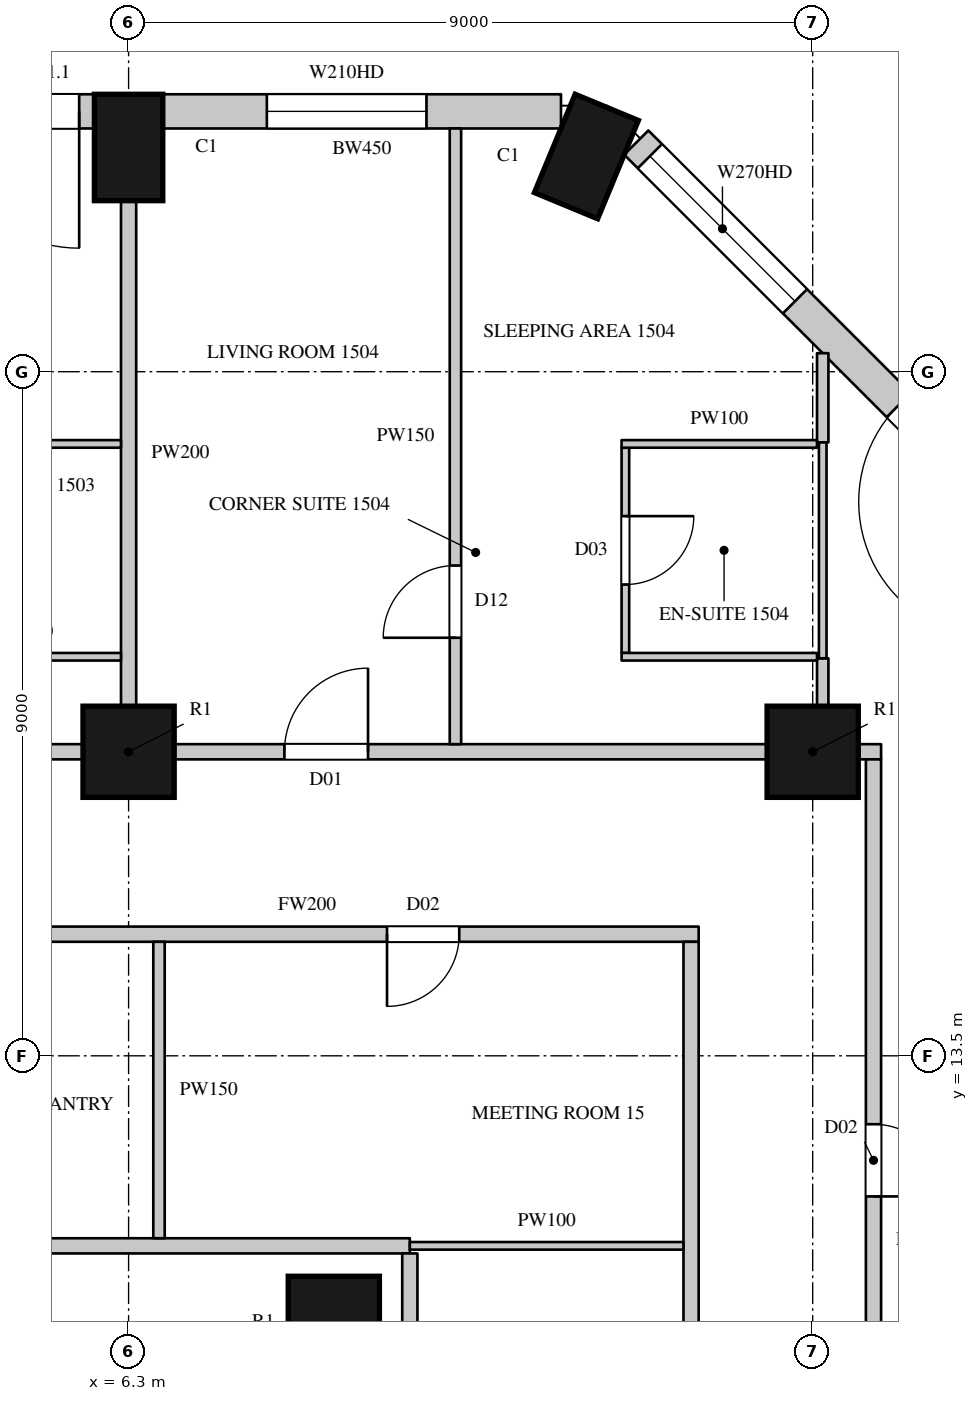
"""IFC4 building model, lengths in metres.
Left out: names, types, materials, properties, quantities, classifications, styles, units other than length and angle.
Written with IfcOpenShell. Run it as: python <this file> out.ifc"""

import sys

from ifc_helpers import new_model, si_unit, direction, frame, frame_2d, origin, origin_2d, place, context, subcontext, project, spatial, rectangle, circle, extrude, element, fill, save


model = new_model("IFC4")
c1 = context("Model", 3, precision=1e-05, world=origin(), true_north=direction((0.0, 1.0)))
c2 = subcontext(c1, "Body", "Model", "MODEL_VIEW")
j1 = project(units=[si_unit("LENGTHUNIT", "METRE"), si_unit("PLANEANGLEUNIT", "RADIAN")], contexts=[c1])
p1 = place(None, origin())
s1 = spatial("IfcSite", under=j1, at=p1, CompositionType="ELEMENT")
p2 = place(p1, origin())
s2 = spatial("IfcBuilding", under=s1, at=p2, CompositionType="ELEMENT")
p3 = place(p2, frame((0.0, 0.0, 84.3)))
s3 = spatial("IfcBuildingStorey", under=s2, at=p3, CompositionType="ELEMENT", Elevation=84.3)
for number, where, z_axis, x_axis in (
    (1, (12.323, 25.331, 0.0), (0.0, 0.0, 1.0), (-0.924, 0.383, 0.0)),
    (2, (6.3, 25.45, 0.0), (0.0, 0.0, 1.0), (-1.0, 0.0, 0.0)),
):
    element("IfcColumn", number, at=place(p3, frame(where, z_axis=z_axis, x_axis=x_axis)), inside=s3, PredefinedType="COLUMN", context=c2, shape_type="SweptSolid", body=[
        extrude(rectangle(XDim=0.9, YDim=1.4, at=origin_2d()), origin(), (0.0, 0.0, 1.0), 3.6),
    ])
for number, where, z_axis, x_axis in (
    (3, (6.3, 17.5, 0.0), (0.0, 0.0, 1.0), (1.0, 0.0, 0.0)),
    (4, (15.3, 17.5, 0.0), (0.0, 0.0, 1.0), (1.0, 0.0, 0.0)),
    (5, (9.0, 10.0, 0.0), (0.0, 0.0, 1.0), (1.0, 0.0, 0.0)),
):
    element("IfcColumn", number, at=place(p3, frame(where, z_axis=z_axis, x_axis=x_axis)), inside=s3, PredefinedType="COLUMN", context=c2, shape_type="SweptSolid", body=[
        extrude(circle(Radius=0.6, at=origin_2d()), origin(), (0.0, 0.0, 1.0), 3.6),
    ])
p4 = place(p3, frame((18.229, 20.265, 0.0), z_axis=(0.0, 0.0, 1.0), x_axis=(-0.707106781187, 0.707106781187, 0.0)))
e6 = element("IfcWall", 6, at=p4, inside=s3, PredefinedType="SOLIDWALL", context=c2, shape_type="SweptSolid", body=[
    extrude(rectangle(XDim=7.424, YDim=0.45, at=frame_2d((3.712, 0.0))), origin(), (0.0, 0.0, 1.0), 3.3),
])
p5 = place(p4, frame((0.74, 0.0, 0.0)))
e7 = element("IfcOpeningElement", 7, at=p5, cuts=e6, PredefinedType="OPENING", context=c2, shape_type="SweptSolid", body=[
    extrude(rectangle(XDim=1.8, YDim=2.4, at=frame_2d((0.9, 1.2))), frame((0.0, 0.235, 0.0), z_axis=(0.0, -1.0, 0.0), x_axis=(1.0, 0.0, 0.0)), (0.0, 0.0, 1.0), 0.47),
])
p6 = place(p4, frame((4.471, 0.0, 1.05)))
e8 = element("IfcOpeningElement", 8, at=p6, cuts=e6, PredefinedType="OPENING", context=c2, shape_type="SweptSolid", body=[
    extrude(rectangle(XDim=2.7, YDim=2.0, at=frame_2d((1.35, 1.0))), frame((0.0, 0.235, 0.0), z_axis=(0.0, -1.0, 0.0), x_axis=(1.0, 0.0, 0.0)), (0.0, 0.0, 1.0), 0.47),
])
p7 = place(p3, frame((11.989, 25.925, 0.0), z_axis=(0.0, 0.0, 1.0), x_axis=(-1.0, 0.0, 0.0)))
e9 = element("IfcWall", 9, at=p7, inside=s3, PredefinedType="SOLIDWALL", context=c2, shape_type="SweptSolid", body=[
    extrude(rectangle(XDim=5.239, YDim=0.45, at=frame_2d((2.619, 0.0))), origin(), (0.0, 0.0, 1.0), 3.3),
])
p8 = place(p7, frame((1.77, 0.0, 1.05)))
e10 = element("IfcOpeningElement", 10, at=p8, cuts=e9, PredefinedType="OPENING", context=c2, shape_type="SweptSolid", body=[
    extrude(rectangle(XDim=2.1, YDim=2.0, at=frame_2d((1.05, 1.0))), frame((0.0, 0.235, 0.0), z_axis=(0.0, -1.0, 0.0), x_axis=(1.0, 0.0, 0.0)), (0.0, 0.0, 1.0), 0.47),
])
p9 = place(p3, frame((5.85, 25.925, 0.0), z_axis=(0.0, 0.0, 1.0), x_axis=(-1.0, 0.0, 0.0)))
e11 = element("IfcWall", 11, at=p9, inside=s3, PredefinedType="SOLIDWALL", context=c2, shape_type="SweptSolid", body=[
    extrude(rectangle(XDim=8.1, YDim=0.45, at=frame_2d((4.05, 0.0))), origin(), (0.0, 0.0, 1.0), 3.3),
])
p10 = place(p9, frame((0.2, 0.0, 0.0)))
e12 = element("IfcOpeningElement", 12, at=p10, cuts=e11, PredefinedType="OPENING", context=c2, shape_type="SweptSolid", body=[
    extrude(rectangle(XDim=1.8, YDim=2.4, at=frame_2d((0.9, 1.2))), frame((0.0, 0.235, 0.0), z_axis=(0.0, -1.0, 0.0), x_axis=(1.0, 0.0, 0.0)), (0.0, 0.0, 1.0), 0.47),
])
p11 = place(p9, frame((2.2, 0.0, 1.05)))
e13 = element("IfcOpeningElement", 13, at=p11, cuts=e11, PredefinedType="OPENING", context=c2, shape_type="SweptSolid", body=[
    extrude(rectangle(XDim=1.2, YDim=2.0, at=frame_2d((0.6, 1.0))), frame((0.0, 0.235, 0.0), z_axis=(0.0, -1.0, 0.0), x_axis=(1.0, 0.0, 0.0)), (0.0, 0.0, 1.0), 0.47),
])
p12 = place(p9, frame((4.7, 0.0, 0.0)))
e14 = element("IfcOpeningElement", 14, at=p12, cuts=e11, PredefinedType="OPENING", context=c2, shape_type="SweptSolid", body=[
    extrude(rectangle(XDim=1.8, YDim=2.4, at=frame_2d((0.9, 1.2))), frame((0.0, 0.235, 0.0), z_axis=(0.0, -1.0, 0.0), x_axis=(1.0, 0.0, 0.0)), (0.0, 0.0, 1.0), 0.47),
])
p13 = place(p9, frame((6.7, 0.0, 1.05)))
e15 = element("IfcOpeningElement", 15, at=p13, cuts=e11, PredefinedType="OPENING", context=c2, shape_type="SweptSolid", body=[
    extrude(rectangle(XDim=1.2, YDim=2.0, at=frame_2d((0.6, 1.0))), frame((0.0, 0.235, 0.0), z_axis=(0.0, -1.0, 0.0), x_axis=(1.0, 0.0, 0.0)), (0.0, 0.0, 1.0), 0.47),
])
p14 = place(p3, frame((16.486, 23.529, 0.0), z_axis=(0.0, 0.0, 1.0), x_axis=(-0.707022305137, 0.707191247145, 0.0)))
e16 = element("IfcWall", 16, at=p14, inside=s3, PredefinedType="SOLIDWALL", context=c2, shape_type="SweptSolid", body=[
    extrude(rectangle(XDim=1.445, YDim=0.45, at=frame_2d((0.723, 0.0))), origin(), (0.0, 0.0, 1.0), 0.6),
])
p15 = place(p3, frame((-2.1, 17.5, 0.0), z_axis=(0.0, 0.0, 1.0), x_axis=(1.0, 0.0, 0.0)))
e17 = element("IfcWall", 17, at=p15, inside=s3, PredefinedType="PARTITIONING", context=c2, shape_type="SweptSolid", body=[
    extrude(rectangle(XDim=7.8, YDim=0.2, at=frame_2d((3.9, 0.0))), origin(), (0.0, 0.0, 1.0), 2.75),
])
p16 = place(p15, frame((1.55, 0.0, 0.0)))
e18 = element("IfcOpeningElement", 18, at=p16, cuts=e17, PredefinedType="OPENING", context=c2, shape_type="SweptSolid", body=[
    extrude(rectangle(XDim=1.1, YDim=2.4, at=frame_2d((0.55, 1.2))), frame((0.0, 0.11, 0.0), z_axis=(0.0, -1.0, 0.0), x_axis=(1.0, 0.0, 0.0)), (0.0, 0.0, 1.0), 0.22),
])
p17 = place(p3, frame((6.9, 17.5, 0.0), z_axis=(0.0, 0.0, 1.0), x_axis=(1.0, 0.0, 0.0)))
e19 = element("IfcWall", 19, at=p17, inside=s3, PredefinedType="PARTITIONING", context=c2, shape_type="SweptSolid", body=[
    extrude(rectangle(XDim=7.8, YDim=0.2, at=frame_2d((3.9, 0.0))), origin(), (0.0, 0.0, 1.0), 2.75),
])
p18 = place(p17, frame((1.45, 0.0, 0.0)))
e20 = element("IfcOpeningElement", 20, at=p18, cuts=e19, PredefinedType="OPENING", context=c2, shape_type="SweptSolid", body=[
    extrude(rectangle(XDim=1.1, YDim=2.4, at=frame_2d((0.55, 1.2))), frame((0.0, 0.11, 0.0), z_axis=(0.0, -1.0, 0.0), x_axis=(1.0, 0.0, 0.0)), (0.0, 0.0, 1.0), 0.22),
])
p19 = place(p3, frame((15.9, 17.5, 0.0), z_axis=(0.0, 0.0, 1.0), x_axis=(1.0, 0.0, 0.0)))
e21 = element("IfcWall", 21, at=p19, inside=s3, PredefinedType="PARTITIONING", context=c2, shape_type="SweptSolid", body=[
    extrude(rectangle(XDim=0.3, YDim=0.2, at=frame_2d((0.15, 0.0))), origin(), (0.0, 0.0, 1.0), 3.3),
])
p20 = place(p3, frame((-7.9, 11.0, 0.0), z_axis=(0.0, 0.0, 1.0), x_axis=(1.0, 0.0, 0.0)))
e22 = element("IfcWall", 22, at=p20, inside=s3, PredefinedType="PARTITIONING", context=c2, shape_type="SweptSolid", body=[
    extrude(rectangle(XDim=17.9, YDim=0.2, at=frame_2d((8.95, 0.0))), origin(), (0.0, 0.0, 1.0), 3.3),
])
p21 = place(p20, frame((9.5, 0.0, 0.0)))
e23 = element("IfcOpeningElement", 23, at=p21, cuts=e22, PredefinedType="OPENING", context=c2, shape_type="SweptSolid", body=[
    extrude(rectangle(XDim=1.5, YDim=2.2, at=frame_2d((0.75, 1.1))), frame((0.0, 0.11, 0.0), z_axis=(0.0, -1.0, 0.0), x_axis=(1.0, 0.0, 0.0)), (0.0, 0.0, 1.0), 0.22),
])
p22 = place(p3, frame((3.5, 15.1, 0.0), z_axis=(0.0, 0.0, 1.0), x_axis=(1.0, 0.0, 0.0)))
e24 = element("IfcWall", 24, at=p22, inside=s3, PredefinedType="PARTITIONING", context=c2, shape_type="SweptSolid", body=[
    extrude(rectangle(XDim=10.3, YDim=0.2, at=frame_2d((5.15, 0.0))), origin(), (0.0, 0.0, 1.0), 3.3),
])
p23 = place(p22, frame((6.2, 0.0, 0.0)))
e25 = element("IfcOpeningElement", 25, at=p23, cuts=e24, PredefinedType="OPENING", context=c2, shape_type="SweptSolid", body=[
    extrude(rectangle(XDim=0.95, YDim=2.2, at=frame_2d((0.475, 1.1))), frame((0.0, 0.11, 0.0), z_axis=(0.0, -1.0, 0.0), x_axis=(1.0, 0.0, 0.0)), (0.0, 0.0, 1.0), 0.22),
])
p24 = place(p3, frame((10.0, -10.9, 0.0), z_axis=(0.0, 0.0, 1.0), x_axis=(0.0, 1.0, 0.0)))
e26 = element("IfcWall", 26, at=p24, inside=s3, PredefinedType="PARTITIONING", context=c2, shape_type="SweptSolid", body=[
    extrude(rectangle(XDim=21.8, YDim=0.2, at=frame_2d((10.9, 0.0))), origin(), (0.0, 0.0, 1.0), 3.3),
])
p25 = place(p24, frame((15.9, 0.0, 0.0)))
e27 = element("IfcOpeningElement", 27, at=p25, cuts=e26, PredefinedType="OPENING", context=c2, shape_type="SweptSolid", body=[
    extrude(rectangle(XDim=1.5, YDim=2.2, at=frame_2d((0.75, 1.1))), frame((0.0, 0.11, 0.0), z_axis=(0.0, -1.0, 0.0), x_axis=(1.0, 0.0, 0.0)), (0.0, 0.0, 1.0), 0.22),
])
p26 = place(p24, frame((8.75, 0.0, 0.0)))
e28 = element("IfcOpeningElement", 28, at=p26, cuts=e26, PredefinedType="OPENING", context=c2, shape_type="SweptSolid", body=[
    extrude(rectangle(XDim=1.5, YDim=2.2, at=frame_2d((0.75, 1.1))), frame((0.0, 0.11, 0.0), z_axis=(0.0, -1.0, 0.0), x_axis=(1.0, 0.0, 0.0)), (0.0, 0.0, 1.0), 0.22),
])
p27 = place(p3, frame((13.7, 6.825, 0.0), z_axis=(0.0, 0.0, 1.0), x_axis=(0.0, 1.0, 0.0)))
e29 = element("IfcWall", 29, at=p27, inside=s3, PredefinedType="PARTITIONING", context=c2, shape_type="SweptSolid", body=[
    extrude(rectangle(XDim=8.175, YDim=0.2, at=frame_2d((4.087, 0.0))), origin(), (0.0, 0.0, 1.0), 3.3),
])
p28 = place(p3, frame((16.1, 4.75, 0.0), z_axis=(0.0, 0.0, 1.0), x_axis=(0.0, 1.0, 0.0)))
e30 = element("IfcWall", 30, at=p28, inside=s3, PredefinedType="PARTITIONING", context=c2, shape_type="SweptSolid", body=[
    extrude(rectangle(XDim=12.65, YDim=0.2, at=frame_2d((6.325, 0.0))), origin(), (0.0, 0.0, 1.0), 3.3),
])
p29 = place(p28, frame((0.5, 0.0, 0.0)))
e31 = element("IfcOpeningElement", 31, at=p29, cuts=e30, PredefinedType="OPENING", context=c2, shape_type="SweptSolid", body=[
    extrude(rectangle(XDim=0.95, YDim=2.2, at=frame_2d((0.475, 1.1))), frame((0.0, 0.11, 0.0), z_axis=(0.0, -1.0, 0.0), x_axis=(1.0, 0.0, 0.0)), (0.0, 0.0, 1.0), 0.22),
])
p30 = place(p28, frame((6.9, 0.0, 0.0)))
e32 = element("IfcOpeningElement", 32, at=p30, cuts=e30, PredefinedType="OPENING", context=c2, shape_type="SweptSolid", body=[
    extrude(rectangle(XDim=0.95, YDim=2.2, at=frame_2d((0.475, 1.1))), frame((0.0, 0.11, 0.0), z_axis=(0.0, -1.0, 0.0), x_axis=(1.0, 0.0, 0.0)), (0.0, 0.0, 1.0), 0.22),
])
p31 = place(p3, frame((6.7, 11.1, 0.0), z_axis=(0.0, 0.0, 1.0), x_axis=(0.0, 1.0, 0.0)))
e33 = element("IfcWall", 33, at=p31, inside=s3, PredefinedType="PARTITIONING", context=c2, shape_type="SweptSolid", body=[
    extrude(rectangle(XDim=3.9, YDim=0.15, at=frame_2d((1.95, 0.0))), origin(), (0.0, 0.0, 1.0), 3.3),
])
p32 = place(p3, frame((10.6, 17.6, 0.0), z_axis=(0.0, 0.0, 1.0), x_axis=(0.0, 1.0, 0.0)))
e34 = element("IfcWall", 34, at=p32, inside=s3, PredefinedType="PARTITIONING", context=c2, shape_type="SweptSolid", body=[
    extrude(rectangle(XDim=8.1, YDim=0.15, at=frame_2d((4.05, 0.0))), origin(), (0.0, 0.0, 1.0), 3.3),
])
p33 = place(p32, frame((1.4, 0.0, 0.0)))
e35 = element("IfcOpeningElement", 35, at=p33, cuts=e34, PredefinedType="OPENING", context=c2, shape_type="SweptSolid", body=[
    extrude(rectangle(XDim=0.95, YDim=2.2, at=frame_2d((0.475, 1.1))), frame((0.0, 0.085, 0.0), z_axis=(0.0, -1.0, 0.0), x_axis=(1.0, 0.0, 0.0)), (0.0, 0.0, 1.0), 0.17),
])
p34 = place(p3, frame((15.432, 18.094, 0.0), z_axis=(0.0, 0.0, 1.0), x_axis=(0.0, 1.0, 0.0)))
e36 = element("IfcWall", 36, at=p34, inside=s3, PredefinedType="PARTITIONING", context=c2, shape_type="SweptSolid", body=[
    extrude(rectangle(XDim=0.636, YDim=0.15, at=frame_2d((0.318, 0.0))), origin(), (0.0, 0.0, 1.0), 3.3),
])
p35 = place(p3, frame((15.432, 21.57, 0.0), z_axis=(0.0, 0.0, 1.0), x_axis=(0.0, 1.0, 0.0)))
e37 = element("IfcWall", 37, at=p35, inside=s3, PredefinedType="PARTITIONING", context=c2, shape_type="SweptSolid", body=[
    extrude(rectangle(XDim=1.174, YDim=0.15, at=frame_2d((0.587, 0.0))), origin(), (0.0, 0.0, 1.0), 3.3),
])
p36 = place(p3, frame((6.3, 18.1, 0.0), z_axis=(0.0, 0.0, 1.0), x_axis=(0.0, 1.0, 0.0)))
e38 = element("IfcWall", 38, at=p36, inside=s3, PredefinedType="PARTITIONING", context=c2, shape_type="SweptSolid", body=[
    extrude(rectangle(XDim=6.65, YDim=0.2, at=frame_2d((3.325, 0.0))), origin(), (0.0, 0.0, 1.0), 2.75),
])
for number, where, z_axis, x_axis in (
    (39, (3.654, 18.75, 0.0), (0.0, 0.0, 1.0), (1.0, 0.0, 0.0)),
    (40, (3.654, 21.55, 0.0), (0.0, 0.0, 1.0), (1.0, 0.0, 0.0)),
):
    element("IfcWall", number, at=place(p3, frame(where, z_axis=z_axis, x_axis=x_axis)), inside=s3, PredefinedType="PARTITIONING", context=c2, shape_type="SweptSolid", body=[
        extrude(rectangle(XDim=2.546, YDim=0.1, at=frame_2d((1.273, 0.0))), origin(), (0.0, 0.0, 1.0), 3.3),
    ])
p37 = place(p3, frame((10.0, 11.0, 0.0), z_axis=(0.0, 0.0, 1.0), x_axis=(1.0, 0.0, 0.0)))
e41 = element("IfcWall", 41, at=p37, inside=s3, PredefinedType="PARTITIONING", context=c2, shape_type="SweptSolid", body=[
    extrude(rectangle(XDim=3.6, YDim=0.1, at=frame_2d((1.8, 0.0))), origin(), (0.0, 0.0, 1.0), 3.3),
])
p38 = place(p3, frame((12.836, 18.8, 0.0), z_axis=(0.0, 0.0, 1.0), x_axis=(0.0, 1.0, 0.0)))
e42 = element("IfcWall", 42, at=p38, inside=s3, PredefinedType="PARTITIONING", context=c2, shape_type="SweptSolid", body=[
    extrude(rectangle(XDim=2.7, YDim=0.1, at=frame_2d((1.35, 0.0))), origin(), (0.0, 0.0, 1.0), 3.3),
])
p39 = place(p38, frame((0.9, 0.0, 0.0)))
e43 = element("IfcOpeningElement", 43, at=p39, cuts=e42, PredefinedType="OPENING", context=c2, shape_type="SweptSolid", body=[
    extrude(rectangle(XDim=0.9, YDim=2.2, at=frame_2d((0.45, 1.1))), frame((0.0, 0.06, 0.0), z_axis=(0.0, -1.0, 0.0), x_axis=(1.0, 0.0, 0.0)), (0.0, 0.0, 1.0), 0.12),
])
for number, where, z_axis, x_axis in (
    (44, (12.786, 18.75, 0.0), (0.0, 0.0, 1.0), (1.0, 0.0, 0.0)),
    (45, (12.786, 21.55, 0.0), (0.0, 0.0, 1.0), (1.0, 0.0, 0.0)),
):
    element("IfcWall", number, at=place(p3, frame(where, z_axis=z_axis, x_axis=x_axis)), inside=s3, PredefinedType="PARTITIONING", context=c2, shape_type="SweptSolid", body=[
        extrude(rectangle(XDim=2.571, YDim=0.1, at=frame_2d((1.286, 0.0))), origin(), (0.0, 0.0, 1.0), 3.3),
    ])
p40 = place(p3, frame((15.432, 18.73, 0.0), z_axis=(0.0, 0.0, 1.0), x_axis=(0.0, 1.0, 0.0)))
e46 = element("IfcWall", 46, at=p40, inside=s3, PredefinedType="PARTITIONING", context=c2, shape_type="SweptSolid", body=[
    extrude(rectangle(XDim=2.84, YDim=0.1, at=frame_2d((1.42, 0.0))), origin(), (0.0, 0.0, 1.0), 3.3),
])
p41 = place(p5, origin())
e47 = element("IfcDoor", 47, at=p41, inside=s3, OperationType="SLIDING_TO_LEFT", PredefinedType="DOOR", context=c2, shape_type="SweptSolid", body=[
    extrude(rectangle(XDim=1.8, YDim=2.4, at=frame_2d((0.9, 1.2))), frame((0.0, 0.13, 0.0), z_axis=(0.0, -1.0, 0.0), x_axis=(1.0, 0.0, 0.0)), (0.0, 0.0, 1.0), 0.05),
])
fill(e7, e47)
p42 = place(p6, origin())
e48 = element("IfcWindow", 48, at=p42, inside=s3, PartitioningType="SINGLE_PANEL", PredefinedType="WINDOW", context=c2, shape_type="SweptSolid", body=[
    extrude(rectangle(XDim=2.7, YDim=2.0, at=frame_2d((1.35, 1.0))), frame((0.0, 0.135, 0.0), z_axis=(0.0, -1.0, 0.0), x_axis=(1.0, 0.0, 0.0)), (0.0, 0.0, 1.0), 0.06),
])
fill(e8, e48)
p43 = place(p10, origin())
e49 = element("IfcDoor", 49, at=p43, inside=s3, OperationType="SLIDING_TO_LEFT", PredefinedType="DOOR", context=c2, shape_type="SweptSolid", body=[
    extrude(rectangle(XDim=1.8, YDim=2.4, at=frame_2d((0.9, 1.2))), frame((0.0, 0.13, 0.0), z_axis=(0.0, -1.0, 0.0), x_axis=(1.0, 0.0, 0.0)), (0.0, 0.0, 1.0), 0.05),
])
fill(e12, e49)
p44 = place(p23, origin())
e50 = element("IfcDoor", 50, at=p44, inside=s3, OperationType="SINGLE_SWING_RIGHT", PredefinedType="DOOR", context=c2, shape_type="SweptSolid", body=[
    extrude(rectangle(XDim=0.95, YDim=2.2, at=frame_2d((0.475, 1.1))), frame((0.0, 0.025, 0.0), z_axis=(0.0, -1.0, 0.0), x_axis=(1.0, 0.0, 0.0)), (0.0, 0.0, 1.0), 0.05),
])
fill(e25, e50)
p45 = place(p18, origin())
e51 = element("IfcDoor", 51, at=p45, inside=s3, OperationType="SINGLE_SWING_RIGHT", PredefinedType="DOOR", context=c2, shape_type="SweptSolid", body=[
    extrude(rectangle(XDim=1.1, YDim=2.4, at=frame_2d((0.55, 1.2))), frame((0.0, 0.025, 0.0), z_axis=(0.0, -1.0, 0.0), x_axis=(1.0, 0.0, 0.0)), (0.0, 0.0, 1.0), 0.05),
])
fill(e20, e51)
p46 = place(p33, origin())
e52 = element("IfcDoor", 52, at=p46, inside=s3, OperationType="SINGLE_SWING_LEFT", PredefinedType="DOOR", context=c2, shape_type="SweptSolid", body=[
    extrude(rectangle(XDim=0.95, YDim=2.2, at=frame_2d((0.475, 1.1))), frame((0.0, 0.025, 0.0), z_axis=(0.0, -1.0, 0.0), x_axis=(1.0, 0.0, 0.0)), (0.0, 0.0, 1.0), 0.05),
])
fill(e35, e52)
p47 = place(p39, origin())
e53 = element("IfcDoor", 53, at=p47, inside=s3, OperationType="SINGLE_SWING_LEFT", PredefinedType="DOOR", context=c2, shape_type="SweptSolid", body=[
    extrude(rectangle(XDim=0.9, YDim=2.2, at=frame_2d((0.45, 1.1))), frame((0.0, 0.025, 0.0), z_axis=(0.0, -1.0, 0.0), x_axis=(1.0, 0.0, 0.0)), (0.0, 0.0, 1.0), 0.05),
])
fill(e43, e53)
p48 = place(p30, origin())
e54 = element("IfcDoor", 54, at=p48, inside=s3, OperationType="SINGLE_SWING_RIGHT", PredefinedType="DOOR", context=c2, shape_type="SweptSolid", body=[
    extrude(rectangle(XDim=0.95, YDim=2.2, at=frame_2d((0.475, 1.1))), frame((0.0, 0.025, 0.0), z_axis=(0.0, -1.0, 0.0), x_axis=(1.0, 0.0, 0.0)), (0.0, 0.0, 1.0), 0.05),
])
fill(e32, e54)
p49 = place(p8, origin())
e55 = element("IfcWindow", 55, at=p49, inside=s3, PartitioningType="SINGLE_PANEL", PredefinedType="WINDOW", context=c2, shape_type="SweptSolid", body=[
    extrude(rectangle(XDim=2.1, YDim=2.0, at=frame_2d((1.05, 1.0))), frame((0.0, 0.135, 0.0), z_axis=(0.0, -1.0, 0.0), x_axis=(1.0, 0.0, 0.0)), (0.0, 0.0, 1.0), 0.06),
])
fill(e10, e55)
save(model, sys.argv[1])
